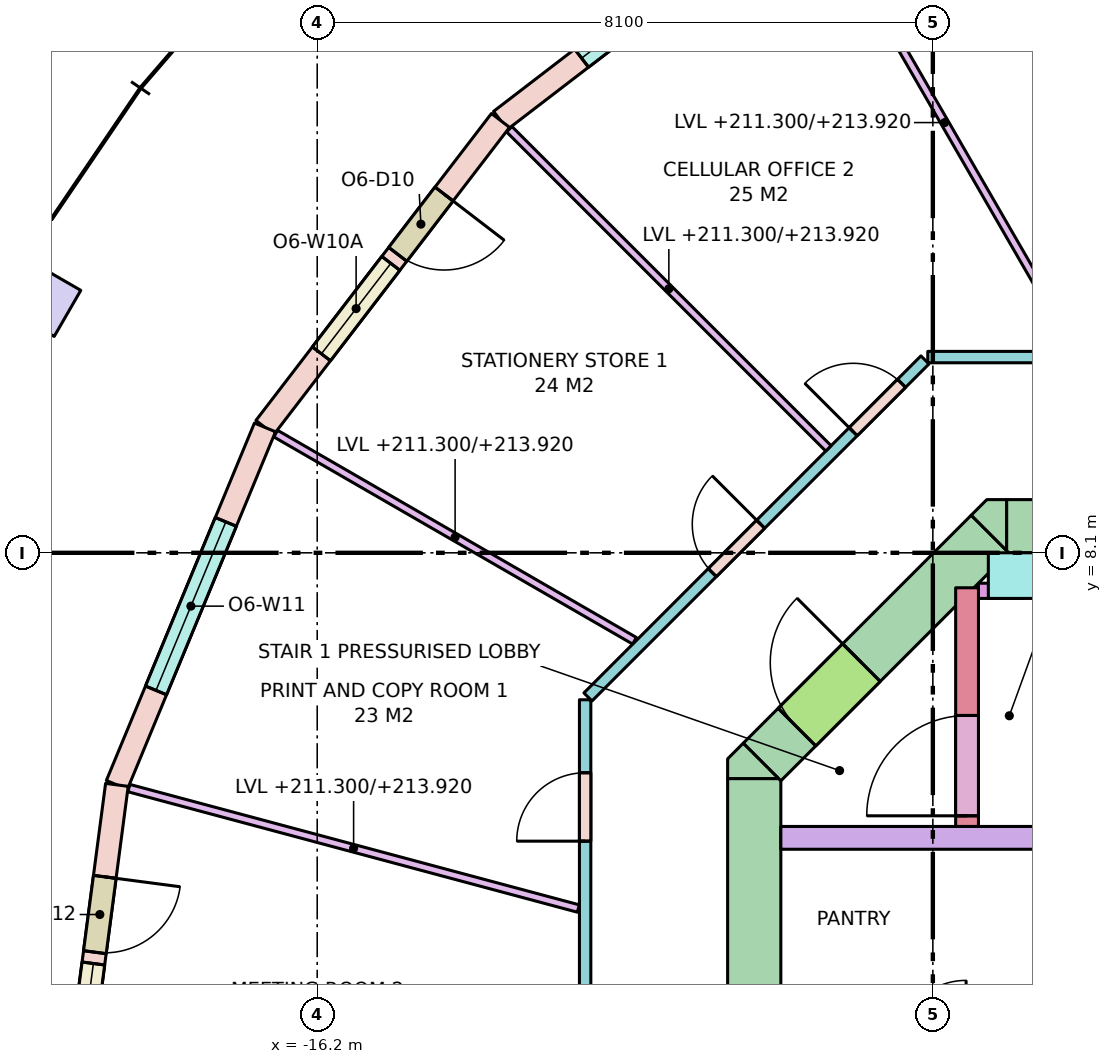
"""IFC4 building model, lengths in metres.
Left out: names, types, materials, properties, quantities, classifications, styles, units other than length and angle.
Written with IfcOpenShell. Run it as: python <this file> out.ifc"""

import sys

from ifc_helpers import new_model, si_unit, direction, frame, frame_2d, origin, origin_2d, place, context, subcontext, project, spatial, polyline, rectangle, outline, extrude, element, fill, save


model = new_model("IFC4")
c1 = context("Model", 3, precision=1e-05, world=origin(), true_north=direction((0.0, 1.0)))
c2 = subcontext(c1, "Body", "Model", "MODEL_VIEW")
j1 = project(units=[si_unit("LENGTHUNIT", "METRE"), si_unit("PLANEANGLEUNIT", "RADIAN")], contexts=[c1])
p1 = place(None, origin())
s1 = spatial("IfcSite", under=j1, at=p1, CompositionType="ELEMENT")
p2 = place(p1, origin())
s2 = spatial("IfcBuilding", under=s1, at=p2, CompositionType="ELEMENT")
p3 = place(p2, frame((0.0, 0.0, 211.3)))
s3 = spatial("IfcBuildingStorey", under=s2, at=p3, CompositionType="ELEMENT", Elevation=211.3)
p4 = place(p3, frame((-19.919, 11.5, 0.0), z_axis=(0.0, 0.0, 1.0), x_axis=(-0.5, -0.866025403784, 0.0)))
e1 = element("IfcColumn", 1, at=p4, inside=s3, PredefinedType="COLUMN", context=c2, shape_type="SweptSolid", body=[
    extrude(rectangle(XDim=0.7, YDim=1.0, at=origin_2d()), origin(), (0.0, 0.0, 1.0), 3.7),
])
p5 = place(p3, frame((-7.13, 8.45, -0.28), z_axis=(0.0, 0.0, 1.0), x_axis=(1.0, 0.0, 0.0)))
e2 = element("IfcWall", 2, at=p5, inside=s3, PredefinedType="SHEAR", context=c2, shape_type="SweptSolid", body=[
    extrude(rectangle(XDim=14.26, YDim=0.7, at=frame_2d((7.13, 0.0))), origin(), (0.0, 0.0, 1.0), 3.7),
])
p6 = place(p5, frame((5.48, 0.0, 0.28)))
e3 = element("IfcOpeningElement", 3, at=p6, cuts=e2, PredefinedType="OPENING", context=c2, shape_type="SweptSolid", body=[
    extrude(rectangle(XDim=0.7, YDim=2.1, at=frame_2d((0.35, 1.05))), frame((0.0, 0.36, 0.0), z_axis=(0.0, -1.0, 0.0), x_axis=(1.0, 0.0, 0.0)), (0.0, 0.0, 1.0), 0.72),
])
p7 = place(p5, frame((7.155, 0.0, 0.28)))
e4 = element("IfcOpeningElement", 4, at=p7, cuts=e2, PredefinedType="OPENING", context=c2, shape_type="SweptSolid", body=[
    extrude(rectangle(XDim=0.9, YDim=2.1, at=frame_2d((0.45, 1.05))), frame((0.0, 0.36, 0.0), z_axis=(0.0, -1.0, 0.0), x_axis=(1.0, 0.0, 0.0)), (0.0, 0.0, 1.0), 0.72),
])
p8 = place(p3, frame((-10.45, -5.13, -0.28), z_axis=(0.0, 0.0, 1.0), x_axis=(0.0, 1.0, 0.0)))
e5 = element("IfcWall", 5, at=p8, inside=s3, PredefinedType="SHEAR", context=c2, shape_type="SweptSolid", body=[
    extrude(rectangle(XDim=10.26, YDim=0.7, at=frame_2d((5.13, 0.0))), origin(), (0.0, 0.0, 1.0), 3.7),
])
p9 = place(p8, frame((4.13, 0.0, 0.28)))
e6 = element("IfcOpeningElement", 6, at=p9, cuts=e5, PredefinedType="OPENING", context=c2, shape_type="SweptSolid", body=[
    extrude(rectangle(XDim=2.0, YDim=2.1, at=frame_2d((1.0, 1.05))), frame((0.0, 0.36, 0.0), z_axis=(0.0, -1.0, 0.0), x_axis=(1.0, 0.0, 0.0)), (0.0, 0.0, 1.0), 0.72),
])
p10 = place(p3, frame((-10.347, 5.347, -0.28), z_axis=(0.0, 0.0, 1.0), x_axis=(0.707106781187, 0.707106781187, 0.0)))
e7 = element("IfcWall", 7, at=p10, inside=s3, PredefinedType="SHEAR", context=c2, shape_type="SweptSolid", body=[
    extrude(rectangle(XDim=4.243, YDim=0.7, at=frame_2d((2.121, 0.0))), origin(), (0.0, 0.0, 1.0), 3.7),
])
p11 = place(p10, frame((0.65, 0.0, 0.28)))
e8 = element("IfcOpeningElement", 8, at=p11, cuts=e7, PredefinedType="OPENING", context=c2, shape_type="SweptSolid", body=[
    extrude(rectangle(XDim=1.2, YDim=2.1, at=frame_2d((0.6, 1.05))), frame((0.0, 0.36, 0.0), z_axis=(0.0, -1.0, 0.0), x_axis=(1.0, 0.0, 0.0)), (0.0, 0.0, 1.0), 0.72),
])
p12 = place(p3, frame((0.0, 0.0, -0.28)))
e9 = element("IfcWall", 9, at=p12, inside=s3, PredefinedType="SHEAR", context=c2, shape_type="SweptSolid", body=[
    extrude(outline(polyline([(-10.595, 5.595), (-10.595, 5.595), (-10.595, 5.595), (-10.13, 5.13), (-10.8, 5.13), (-10.8, 5.13), (-10.8, 5.39), (-10.595, 5.595)])), origin(), (0.0, 0.0, 1.0), 3.7),
])
p13 = place(p3, frame((0.0, 0.0, -0.28)))
e10 = element("IfcWall", 10, at=p13, inside=s3, PredefinedType="SHEAR", context=c2, shape_type="SweptSolid", body=[
    extrude(outline(polyline([(-7.39, 8.8), (-7.13, 8.8), (-7.13, 8.8), (-7.13, 8.13), (-7.595, 8.595), (-7.595, 8.595), (-7.595, 8.595), (-7.39, 8.8)])), origin(), (0.0, 0.0, 1.0), 3.7),
])
p14 = place(p3, frame((-10.1, 4.35, 0.0), z_axis=(0.0, 0.0, 1.0), x_axis=(1.0, 0.0, 0.0)))
e11 = element("IfcWall", 11, at=p14, inside=s3, PredefinedType="SOLIDWALL", context=c2, shape_type="SweptSolid", body=[
    extrude(rectangle(XDim=8.1, YDim=0.3, at=frame_2d((4.05, 0.0))), origin(), (0.0, 0.0, 1.0), 3.42),
])
p15 = place(p3, frame((-7.65, 4.5, 0.0), z_axis=(0.0, 0.0, 1.0), x_axis=(0.0, 1.0, 0.0)))
e12 = element("IfcWall", 12, at=p15, inside=s3, PredefinedType="SHEAR", context=c2, shape_type="SweptSolid", body=[
    extrude(rectangle(XDim=3.14, YDim=0.3, at=frame_2d((1.57, 0.0))), origin(), (0.0, 0.0, 1.0), 3.42),
])
p16 = place(p15, frame((0.14, 0.0, 0.0)))
e13 = element("IfcOpeningElement", 13, at=p16, cuts=e12, PredefinedType="OPENING", context=c2, shape_type="SweptSolid", body=[
    extrude(rectangle(XDim=1.32, YDim=2.1, at=frame_2d((0.66, 1.05))), frame((0.0, 0.16, 0.0), z_axis=(0.0, -1.0, 0.0), x_axis=(1.0, 0.0, 0.0)), (0.0, 0.0, 1.0), 0.32),
])
p17 = place(p3, frame((-7.37, 7.8, 0.0), z_axis=(0.0, 0.0, 1.0), x_axis=(1.0, 0.0, 0.0)))
e14 = element("IfcWall", 14, at=p17, inside=s3, PredefinedType="SHEAR", context=c2, shape_type="SweptSolid", body=[
    extrude(rectangle(XDim=5.37, YDim=0.6, at=frame_2d((2.685, 0.0))), origin(), (0.0, 0.0, 1.0), 3.42),
])
p18 = place(p3, frame((-7.5, 7.6, 0.0), z_axis=(0.0, 0.0, 1.0), x_axis=(1.0, 0.0, 0.0)))
e15 = element("IfcWall", 15, at=p18, inside=s3, PredefinedType="SHEAR", context=c2, shape_type="SweptSolid", body=[
    extrude(rectangle(XDim=0.6, YDim=0.2, at=frame_2d((0.3, 0.0))), origin(), (0.0, 0.0, 1.0), 3.42),
])
p19 = place(p3, frame((-9.75, 16.887, 0.0), z_axis=(0.0, 0.0, 1.0), x_axis=(-0.79335619014, -0.608757714995, 0.0)))
e16 = element("IfcWall", 16, at=p19, inside=s3, PredefinedType="STANDARD", context=c2, shape_type="SweptSolid", body=[
    extrude(rectangle(XDim=5.091, YDim=0.3, at=frame_2d((2.545, 0.0))), origin(), (0.0, 0.0, 1.0), 3.42),
])
p20 = place(p19, frame((1.345, 0.0, 0.8)))
e17 = element("IfcOpeningElement", 17, at=p20, cuts=e16, PredefinedType="OPENING", context=c2, shape_type="SweptSolid", body=[
    extrude(rectangle(XDim=2.4, YDim=2.4, at=frame_2d((1.2, 1.2))), frame((0.0, 0.16, 0.0), z_axis=(0.0, -1.0, 0.0), x_axis=(1.0, 0.0, 0.0)), (0.0, 0.0, 1.0), 0.32),
])
p21 = place(p3, frame((-13.789, 13.789, 0.0), z_axis=(0.0, 0.0, 1.0), x_axis=(-0.608757714995, -0.79335619014, 0.0)))
e18 = element("IfcWall", 18, at=p21, inside=s3, PredefinedType="STANDARD", context=c2, shape_type="SweptSolid", body=[
    extrude(rectangle(XDim=5.091, YDim=0.3, at=frame_2d((2.545, 0.0))), origin(), (0.0, 0.0, 1.0), 3.42),
])
p22 = place(p21, frame((1.22, 0.0, 0.0)))
e19 = element("IfcOpeningElement", 19, at=p22, cuts=e18, PredefinedType="OPENING", context=c2, shape_type="SweptSolid", body=[
    extrude(rectangle(XDim=1.0, YDim=2.4, at=frame_2d((0.5, 1.2))), frame((0.0, 0.16, 0.0), z_axis=(0.0, -1.0, 0.0), x_axis=(1.0, 0.0, 0.0)), (0.0, 0.0, 1.0), 0.32),
])
p23 = place(p21, frame((2.37, 0.0, 0.8)))
e20 = element("IfcOpeningElement", 20, at=p23, cuts=e18, PredefinedType="OPENING", context=c2, shape_type="SweptSolid", body=[
    extrude(rectangle(XDim=1.5, YDim=2.4, at=frame_2d((0.75, 1.2))), frame((0.0, 0.16, 0.0), z_axis=(0.0, -1.0, 0.0), x_axis=(1.0, 0.0, 0.0)), (0.0, 0.0, 1.0), 0.32),
])
p24 = place(p3, frame((-16.887, 9.75, 0.0), z_axis=(0.0, 0.0, 1.0), x_axis=(-0.382724538613, -0.923862504675, 0.0)))
e21 = element("IfcWall", 21, at=p24, inside=s3, PredefinedType="STANDARD", context=c2, shape_type="SweptSolid", body=[
    extrude(rectangle(XDim=5.091, YDim=0.3, at=frame_2d((2.545, 0.0))), origin(), (0.0, 0.0, 1.0), 3.42),
])
p25 = place(p24, frame((1.345, 0.0, 0.8)))
e22 = element("IfcOpeningElement", 22, at=p25, cuts=e21, PredefinedType="OPENING", context=c2, shape_type="SweptSolid", body=[
    extrude(rectangle(XDim=2.4, YDim=2.4, at=frame_2d((1.2, 1.2))), frame((0.0, 0.16, 0.0), z_axis=(0.0, -1.0, 0.0), x_axis=(1.0, 0.0, 0.0)), (0.0, 0.0, 1.0), 0.32),
])
p26 = place(p3, frame((-18.836, 5.047, 0.0), z_axis=(0.0, 0.0, 1.0), x_axis=(-0.130495451964, -0.99144890792, 0.0)))
e23 = element("IfcWall", 23, at=p26, inside=s3, PredefinedType="STANDARD", context=c2, shape_type="SweptSolid", body=[
    extrude(rectangle(XDim=5.091, YDim=0.3, at=frame_2d((2.545, 0.0))), origin(), (0.0, 0.0, 1.0), 3.42),
])
p27 = place(p26, frame((1.22, 0.0, 0.0)))
e24 = element("IfcOpeningElement", 24, at=p27, cuts=e23, PredefinedType="OPENING", context=c2, shape_type="SweptSolid", body=[
    extrude(rectangle(XDim=1.0, YDim=2.4, at=frame_2d((0.5, 1.2))), frame((0.0, 0.16, 0.0), z_axis=(0.0, -1.0, 0.0), x_axis=(1.0, 0.0, 0.0)), (0.0, 0.0, 1.0), 0.32),
])
p28 = place(p26, frame((2.37, 0.0, 0.8)))
e25 = element("IfcOpeningElement", 25, at=p28, cuts=e23, PredefinedType="OPENING", context=c2, shape_type="SweptSolid", body=[
    extrude(rectangle(XDim=1.5, YDim=2.4, at=frame_2d((0.75, 1.2))), frame((0.0, 0.16, 0.0), z_axis=(0.0, -1.0, 0.0), x_axis=(1.0, 0.0, 0.0)), (0.0, 0.0, 1.0), 0.32),
])
p29 = place(p3, frame((-12.675, -6.167, 0.0), z_axis=(0.0, 0.0, 1.0), x_axis=(0.0, 1.0, 0.0)))
e26 = element("IfcWall", 26, at=p29, inside=s3, PredefinedType="PARTITIONING", context=c2, shape_type="SweptSolid", body=[
    extrude(rectangle(XDim=12.333, YDim=0.15, at=frame_2d((6.167, 0.0))), origin(), (0.0, 0.0, 1.0), 2.62),
])
p30 = place(p29, frame((10.473, 0.0, 0.0)))
e27 = element("IfcOpeningElement", 27, at=p30, cuts=e26, PredefinedType="OPENING", context=c2, shape_type="SweptSolid", body=[
    extrude(rectangle(XDim=0.9, YDim=2.1, at=frame_2d((0.45, 1.05))), frame((0.0, 0.085, 0.0), z_axis=(0.0, -1.0, 0.0), x_axis=(1.0, 0.0, 0.0)), (0.0, 0.0, 1.0), 0.17),
])
p31 = place(p29, frame((7.416, 0.0, 0.0)))
e28 = element("IfcOpeningElement", 28, at=p31, cuts=e26, PredefinedType="OPENING", context=c2, shape_type="SweptSolid", body=[
    extrude(rectangle(XDim=0.9, YDim=2.1, at=frame_2d((0.45, 1.05))), frame((0.0, 0.085, 0.0), z_axis=(0.0, -1.0, 0.0), x_axis=(1.0, 0.0, 0.0)), (0.0, 0.0, 1.0), 0.17),
])
p32 = place(p29, frame((4.018, 0.0, 0.0)))
e29 = element("IfcOpeningElement", 29, at=p32, cuts=e26, PredefinedType="OPENING", context=c2, shape_type="SweptSolid", body=[
    extrude(rectangle(XDim=0.9, YDim=2.1, at=frame_2d((0.45, 1.05))), frame((0.0, 0.085, 0.0), z_axis=(0.0, -1.0, 0.0), x_axis=(1.0, 0.0, 0.0)), (0.0, 0.0, 1.0), 0.17),
])
p33 = place(p29, frame((0.46, 0.0, 0.0)))
e30 = element("IfcOpeningElement", 30, at=p33, cuts=e26, PredefinedType="OPENING", context=c2, shape_type="SweptSolid", body=[
    extrude(rectangle(XDim=1.8, YDim=2.1, at=frame_2d((0.9, 1.05))), frame((0.0, 0.085, 0.0), z_axis=(0.0, -1.0, 0.0), x_axis=(1.0, 0.0, 0.0)), (0.0, 0.0, 1.0), 0.17),
])
p34 = place(p3, frame((-12.638, 6.204, 0.0), z_axis=(0.0, 0.0, 1.0), x_axis=(0.707106781187, 0.707106781187, 0.0)))
e31 = element("IfcWall", 31, at=p34, inside=s3, PredefinedType="PARTITIONING", context=c2, shape_type="SweptSolid", body=[
    extrude(rectangle(XDim=6.271, YDim=0.15, at=frame_2d((3.135, 0.0))), origin(), (0.0, 0.0, 1.0), 2.62),
])
p35 = place(p34, frame((4.935, 0.0, 0.0)))
e32 = element("IfcOpeningElement", 32, at=p35, cuts=e31, PredefinedType="OPENING", context=c2, shape_type="SweptSolid", body=[
    extrude(rectangle(XDim=0.9, YDim=2.1, at=frame_2d((0.45, 1.05))), frame((0.0, 0.085, 0.0), z_axis=(0.0, -1.0, 0.0), x_axis=(1.0, 0.0, 0.0)), (0.0, 0.0, 1.0), 0.17),
])
p36 = place(p34, frame((2.314, 0.0, 0.0)))
e33 = element("IfcOpeningElement", 33, at=p36, cuts=e31, PredefinedType="OPENING", context=c2, shape_type="SweptSolid", body=[
    extrude(rectangle(XDim=0.9, YDim=2.1, at=frame_2d((0.45, 1.05))), frame((0.0, 0.085, 0.0), z_axis=(0.0, -1.0, 0.0), x_axis=(1.0, 0.0, 0.0)), (0.0, 0.0, 1.0), 0.17),
])
p37 = place(p3, frame((-8.167, 10.675, 0.0), z_axis=(0.0, 0.0, 1.0), x_axis=(1.0, 0.0, 0.0)))
e34 = element("IfcWall", 34, at=p37, inside=s3, PredefinedType="PARTITIONING", context=c2, shape_type="SweptSolid", body=[
    extrude(rectangle(XDim=16.333, YDim=0.15, at=frame_2d((8.167, 0.0))), origin(), (0.0, 0.0, 1.0), 2.62),
])
p38 = place(p37, frame((9.148, 0.0, 0.0)))
e35 = element("IfcOpeningElement", 35, at=p38, cuts=e34, PredefinedType="OPENING", context=c2, shape_type="SweptSolid", body=[
    extrude(rectangle(XDim=0.9, YDim=2.1, at=frame_2d((0.45, 1.05))), frame((0.0, 0.085, 0.0), z_axis=(0.0, -1.0, 0.0), x_axis=(1.0, 0.0, 0.0)), (0.0, 0.0, 1.0), 0.17),
])
p39 = place(p37, frame((4.581, 0.0, 0.0)))
e36 = element("IfcOpeningElement", 36, at=p39, cuts=e34, PredefinedType="OPENING", context=c2, shape_type="SweptSolid", body=[
    extrude(rectangle(XDim=1.0, YDim=2.1, at=frame_2d((0.5, 1.05))), frame((0.0, 0.085, 0.0), z_axis=(0.0, -1.0, 0.0), x_axis=(1.0, 0.0, 0.0)), (0.0, 0.0, 1.0), 0.17),
])
p40 = place(p3, frame((-6.221, 10.775, 0.0), z_axis=(0.0, 0.0, 1.0), x_axis=(-0.500015661236, 0.866016361577, 0.0)))
e37 = element("IfcWall", 37, at=p40, inside=s3, PredefinedType="PARTITIONING", context=c2, shape_type="SweptSolid", body=[
    extrude(rectangle(XDim=6.895, YDim=0.1, at=frame_2d((3.448, 0.0))), origin(), (0.0, 0.0, 1.0), 2.62),
])
p41 = place(p3, frame((-9.474, 9.474, 0.0), z_axis=(0.0, 0.0, 1.0), x_axis=(-0.707106781187, 0.707106781187, 0.0)))
e38 = element("IfcWall", 38, at=p41, inside=s3, PredefinedType="PARTITIONING", context=c2, shape_type="SweptSolid", body=[
    extrude(rectangle(XDim=5.938, YDim=0.1, at=frame_2d((2.969, 0.0))), origin(), (0.0, 0.0, 1.0), 2.62),
])
p42 = place(p3, frame((-12.025, 6.943, 0.0), z_axis=(0.0, 0.0, 1.0), x_axis=(-0.866029712004, 0.499992537871, 0.0)))
e39 = element("IfcWall", 39, at=p42, inside=s3, PredefinedType="PARTITIONING", context=c2, shape_type="SweptSolid", body=[
    extrude(rectangle(XDim=5.451, YDim=0.1, at=frame_2d((2.726, 0.0))), origin(), (0.0, 0.0, 1.0), 2.62),
])
p43 = place(p3, frame((-12.764, 3.42, 0.0), z_axis=(0.0, 0.0, 1.0), x_axis=(-0.965925800266, 0.258819142221, 0.0)))
e40 = element("IfcWall", 40, at=p43, inside=s3, PredefinedType="PARTITIONING", context=c2, shape_type="SweptSolid", body=[
    extrude(rectangle(XDim=6.122, YDim=0.1, at=frame_2d((3.061, 0.0))), origin(), (0.0, 0.0, 1.0), 2.62),
])
p44 = place(p20, origin())
e41 = element("IfcWindow", 41, at=p44, inside=s3, PartitioningType="SINGLE_PANEL", PredefinedType="WINDOW", context=c2, shape_type="SweptSolid", body=[
    extrude(rectangle(XDim=2.4, YDim=2.4, at=frame_2d((1.2, 1.2))), frame((0.0, 0.03, 0.0), z_axis=(0.0, -1.0, 0.0), x_axis=(1.0, 0.0, 0.0)), (0.0, 0.0, 1.0), 0.06),
])
fill(e17, e41)
p45 = place(p22, origin())
e42 = element("IfcDoor", 42, at=p45, inside=s3, OperationType="SINGLE_SWING_LEFT", PredefinedType="DOOR", context=c2, shape_type="SweptSolid", body=[
    extrude(rectangle(XDim=1.0, YDim=2.4, at=frame_2d((0.5, 1.2))), frame((0.0, 0.025, 0.0), z_axis=(0.0, -1.0, 0.0), x_axis=(1.0, 0.0, 0.0)), (0.0, 0.0, 1.0), 0.05),
])
fill(e19, e42)
p46 = place(p23, origin())
e43 = element("IfcWindow", 43, at=p46, inside=s3, PartitioningType="SINGLE_PANEL", PredefinedType="WINDOW", context=c2, shape_type="SweptSolid", body=[
    extrude(rectangle(XDim=1.5, YDim=2.4, at=frame_2d((0.75, 1.2))), frame((0.0, 0.03, 0.0), z_axis=(0.0, -1.0, 0.0), x_axis=(1.0, 0.0, 0.0)), (0.0, 0.0, 1.0), 0.06),
])
fill(e20, e43)
p47 = place(p25, origin())
e44 = element("IfcWindow", 44, at=p47, inside=s3, PartitioningType="SINGLE_PANEL", PredefinedType="WINDOW", context=c2, shape_type="SweptSolid", body=[
    extrude(rectangle(XDim=2.4, YDim=2.4, at=frame_2d((1.2, 1.2))), frame((0.0, 0.03, 0.0), z_axis=(0.0, -1.0, 0.0), x_axis=(1.0, 0.0, 0.0)), (0.0, 0.0, 1.0), 0.06),
])
fill(e22, e44)
p48 = place(p27, origin())
e45 = element("IfcDoor", 45, at=p48, inside=s3, OperationType="SINGLE_SWING_LEFT", PredefinedType="DOOR", context=c2, shape_type="SweptSolid", body=[
    extrude(rectangle(XDim=1.0, YDim=2.4, at=frame_2d((0.5, 1.2))), frame((0.0, 0.025, 0.0), z_axis=(0.0, -1.0, 0.0), x_axis=(1.0, 0.0, 0.0)), (0.0, 0.0, 1.0), 0.05),
])
fill(e24, e45)
p49 = place(p28, origin())
e46 = element("IfcWindow", 46, at=p49, inside=s3, PartitioningType="SINGLE_PANEL", PredefinedType="WINDOW", context=c2, shape_type="SweptSolid", body=[
    extrude(rectangle(XDim=1.5, YDim=2.4, at=frame_2d((0.75, 1.2))), frame((0.0, 0.03, 0.0), z_axis=(0.0, -1.0, 0.0), x_axis=(1.0, 0.0, 0.0)), (0.0, 0.0, 1.0), 0.06),
])
fill(e25, e46)
p50 = place(p16, origin())
e47 = element("IfcDoor", 47, at=p50, inside=s3, OperationType="DOUBLE_DOOR_SINGLE_SWING", PredefinedType="DOOR", context=c2, shape_type="SweptSolid", body=[
    extrude(rectangle(XDim=1.32, YDim=2.1, at=frame_2d((0.66, 1.05))), frame((0.0, 0.025, 0.0), z_axis=(0.0, -1.0, 0.0), x_axis=(1.0, 0.0, 0.0)), (0.0, 0.0, 1.0), 0.05),
])
fill(e13, e47)
p51 = place(p11, origin())
e48 = element("IfcDoor", 48, at=p51, inside=s3, OperationType="SINGLE_SWING_RIGHT", PredefinedType="DOOR", context=c2, shape_type="SweptSolid", body=[
    extrude(rectangle(XDim=1.2, YDim=2.1, at=frame_2d((0.6, 1.05))), frame((0.0, 0.025, 0.0), z_axis=(0.0, -1.0, 0.0), x_axis=(1.0, 0.0, 0.0)), (0.0, 0.0, 1.0), 0.05),
])
fill(e8, e48)
p52 = place(p35, origin())
e49 = element("IfcDoor", 49, at=p52, inside=s3, OperationType="SINGLE_SWING_LEFT", PredefinedType="DOOR", context=c2, shape_type="SweptSolid", body=[
    extrude(rectangle(XDim=0.9, YDim=2.1, at=frame_2d((0.45, 1.05))), frame((0.0, 0.025, 0.0), z_axis=(0.0, -1.0, 0.0), x_axis=(1.0, 0.0, 0.0)), (0.0, 0.0, 1.0), 0.05),
])
fill(e32, e49)
p53 = place(p36, origin())
e50 = element("IfcDoor", 50, at=p53, inside=s3, OperationType="SINGLE_SWING_RIGHT", PredefinedType="DOOR", context=c2, shape_type="SweptSolid", body=[
    extrude(rectangle(XDim=0.9, YDim=2.1, at=frame_2d((0.45, 1.05))), frame((0.0, 0.025, 0.0), z_axis=(0.0, -1.0, 0.0), x_axis=(1.0, 0.0, 0.0)), (0.0, 0.0, 1.0), 0.05),
])
fill(e33, e50)
p54 = place(p30, origin())
e51 = element("IfcDoor", 51, at=p54, inside=s3, OperationType="SINGLE_SWING_LEFT", PredefinedType="DOOR", context=c2, shape_type="SweptSolid", body=[
    extrude(rectangle(XDim=0.9, YDim=2.1, at=frame_2d((0.45, 1.05))), frame((0.0, 0.025, 0.0), z_axis=(0.0, -1.0, 0.0), x_axis=(1.0, 0.0, 0.0)), (0.0, 0.0, 1.0), 0.05),
])
fill(e27, e51)
save(model, sys.argv[1])
